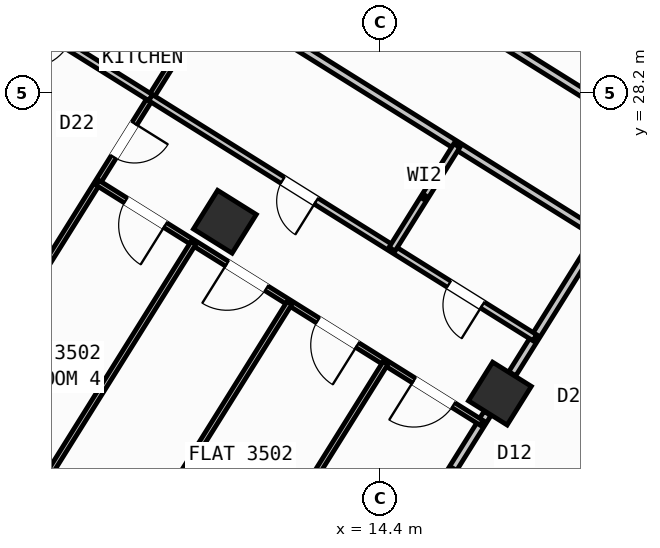
"""IFC4 building model, lengths in metres.
Left out: names, types, materials, properties, quantities, classifications, styles, units other than length and angle.
Written with IfcOpenShell. Run it as: python <this file> out.ifc"""

import sys

from ifc_helpers import new_model, si_unit, direction, frame, frame_2d, origin, origin_2d, place, context, subcontext, project, spatial, rectangle, hollow_rectangle, extrude, source, transform, mapped, element, fill, save


model = new_model("IFC4")
c1 = context("Model", 3, precision=1e-05, world=origin(), true_north=direction((0.0, 1.0)))
c2 = subcontext(c1, "Body", "Model", "MODEL_VIEW")
j1 = project(units=[si_unit("LENGTHUNIT", "METRE"), si_unit("PLANEANGLEUNIT", "RADIAN")], contexts=[c1])
p1 = place(None, origin())
s1 = spatial("IfcSite", under=j1, at=p1, CompositionType="ELEMENT")
p2 = place(p1, origin())
s2 = spatial("IfcBuilding", under=s1, at=p2, CompositionType="ELEMENT")
p3 = place(p2, frame((0.0, 0.0, 140.7)))
s3 = spatial("IfcBuildingStorey", under=s2, at=p3, CompositionType="ELEMENT", Elevation=140.7)
m1 = source(origin(), c2, "Body", "SweptSolid", [
    extrude(hollow_rectangle(XDim=0.9, YDim=0.9, WallThickness=0.036, at=origin_2d()), origin(), (0.0, 0.0, 1.0), 3.6),
])
for number, where, z_axis, x_axis in (
    (1, (16.764, 22.261, 0.0), (0.0, 0.0, 1.0), (-0.848, 0.53, 0.0)),
    (2, (11.336, 25.653, 0.0), (0.0, 0.0, 1.0), (-0.848, 0.53, 0.0)),
):
    element("IfcColumn", number, at=place(p3, frame(where, z_axis=z_axis, x_axis=x_axis)), inside=s3, PredefinedType="COLUMN", context=c2, shape_type="MappedRepresentation", body=[
        mapped(m1, transform((0.0, 0.0, 0.0), scale=1.0)),
    ])
p4 = place(p3, frame((29.268, 6.429, 0.0), z_axis=(0.0, 0.0, 1.0), x_axis=(-0.848049971435, 0.529916263149, 0.0)))
e3 = element("IfcWall", 3, at=p4, inside=s3, PredefinedType="STANDARD", context=c2, shape_type="SweptSolid", body=[
    extrude(rectangle(XDim=31.588, YDim=0.32, at=frame_2d((15.794, 0.0))), origin(), (0.0, 0.0, 1.0), 3.35),
])
p5 = place(p4, frame((16.362, 0.0, 0.0)))
e4 = element("IfcOpeningElement", 4, at=p5, cuts=e3, PredefinedType="OPENING", context=c2, shape_type="SweptSolid", body=[
    extrude(rectangle(XDim=1.2, YDim=2.15, at=frame_2d((0.6, 1.075))), frame((0.0, 0.17, 0.0), z_axis=(0.0, -1.0, 0.0), x_axis=(1.0, 0.0, 0.0)), (0.0, 0.0, 1.0), 0.34),
])
p6 = place(p4, frame((2.989, 0.0, 0.8)))
e5 = element("IfcOpeningElement", 5, at=p6, cuts=e3, PredefinedType="OPENING", context=c2, shape_type="SweptSolid", body=[
    extrude(rectangle(XDim=2.1, YDim=1.55, at=frame_2d((1.05, 0.775))), frame((0.0, 0.17, 0.0), z_axis=(0.0, -1.0, 0.0), x_axis=(1.0, 0.0, 0.0)), (0.0, 0.0, 1.0), 0.34),
])
p7 = place(p4, frame((8.359, 0.0, 0.8)))
e6 = element("IfcOpeningElement", 6, at=p7, cuts=e3, PredefinedType="OPENING", context=c2, shape_type="SweptSolid", body=[
    extrude(rectangle(XDim=2.1, YDim=1.55, at=frame_2d((1.05, 0.775))), frame((0.0, 0.17, 0.0), z_axis=(0.0, -1.0, 0.0), x_axis=(1.0, 0.0, 0.0)), (0.0, 0.0, 1.0), 0.34),
])
p8 = place(p4, frame((13.284, 0.0, 0.95)))
e7 = element("IfcOpeningElement", 7, at=p8, cuts=e3, PredefinedType="OPENING", context=c2, shape_type="SweptSolid", body=[
    extrude(rectangle(XDim=1.2, YDim=1.4, at=frame_2d((0.6, 0.7))), frame((0.0, 0.17, 0.0), z_axis=(0.0, -1.0, 0.0), x_axis=(1.0, 0.0, 0.0)), (0.0, 0.0, 1.0), 0.34),
])
p9 = place(p4, frame((29.188, 0.0, 0.95)))
e8 = element("IfcOpeningElement", 8, at=p9, cuts=e3, PredefinedType="OPENING", context=c2, shape_type="SweptSolid", body=[
    extrude(rectangle(XDim=1.2, YDim=1.4, at=frame_2d((0.6, 0.7))), frame((0.0, 0.17, 0.0), z_axis=(0.0, -1.0, 0.0), x_axis=(1.0, 0.0, 0.0)), (0.0, 0.0, 1.0), 0.34),
])
p10 = place(p4, frame((19.674, 0.0, 1.0)))
e9 = element("IfcOpeningElement", 9, at=p10, cuts=e3, PredefinedType="OPENING", context=c2, shape_type="SweptSolid", body=[
    extrude(rectangle(XDim=0.9, YDim=1.25, at=frame_2d((0.45, 0.625))), frame((0.0, 0.17, 0.0), z_axis=(0.0, -1.0, 0.0), x_axis=(1.0, 0.0, 0.0)), (0.0, 0.0, 1.0), 0.34),
])
p11 = place(p4, frame((21.896, 0.0, 1.0)))
e10 = element("IfcOpeningElement", 10, at=p11, cuts=e3, PredefinedType="OPENING", context=c2, shape_type="SweptSolid", body=[
    extrude(rectangle(XDim=0.9, YDim=1.25, at=frame_2d((0.45, 0.625))), frame((0.0, 0.17, 0.0), z_axis=(0.0, -1.0, 0.0), x_axis=(1.0, 0.0, 0.0)), (0.0, 0.0, 1.0), 0.34),
])
p12 = place(p4, frame((24.106, 0.0, 1.0)))
e11 = element("IfcOpeningElement", 11, at=p12, cuts=e3, PredefinedType="OPENING", context=c2, shape_type="SweptSolid", body=[
    extrude(rectangle(XDim=0.65, YDim=1.15, at=frame_2d((0.325, 0.575))), frame((0.0, 0.17, 0.0), z_axis=(0.0, -1.0, 0.0), x_axis=(1.0, 0.0, 0.0)), (0.0, 0.0, 1.0), 0.34),
])
p13 = place(p4, frame((26.366, 0.0, 1.0)))
e12 = element("IfcOpeningElement", 12, at=p13, cuts=e3, PredefinedType="OPENING", context=c2, shape_type="SweptSolid", body=[
    extrude(rectangle(XDim=0.9, YDim=1.25, at=frame_2d((0.45, 0.625))), frame((0.0, 0.17, 0.0), z_axis=(0.0, -1.0, 0.0), x_axis=(1.0, 0.0, 0.0)), (0.0, 0.0, 1.0), 0.34),
])
p14 = place(p3, frame((2.415, 23.452, 0.0), z_axis=(0.0, 0.0, 1.0), x_axis=(0.52991049553, 0.848053575387, 0.0)))
e13 = element("IfcWall", 13, at=p14, inside=s3, PredefinedType="STANDARD", context=c2, shape_type="SweptSolid", body=[
    extrude(rectangle(XDim=21.587, YDim=0.32, at=frame_2d((10.794, 0.0))), origin(), (0.0, 0.0, 1.0), 2.775),
])
p15 = place(p14, frame((2.356, 0.0, 0.8)))
e14 = element("IfcOpeningElement", 14, at=p15, cuts=e13, PredefinedType="OPENING", context=c2, shape_type="SweptSolid", body=[
    extrude(rectangle(XDim=2.1, YDim=1.55, at=frame_2d((1.05, 0.775))), frame((0.0, 0.17, 0.0), z_axis=(0.0, -1.0, 0.0), x_axis=(1.0, 0.0, 0.0)), (0.0, 0.0, 1.0), 0.34),
])
p16 = place(p14, frame((8.639, 0.0, 1.0)))
e15 = element("IfcOpeningElement", 15, at=p16, cuts=e13, PredefinedType="OPENING", context=c2, shape_type="SweptSolid", body=[
    extrude(rectangle(XDim=0.9, YDim=1.25, at=frame_2d((0.45, 0.625))), frame((0.0, 0.17, 0.0), z_axis=(0.0, -1.0, 0.0), x_axis=(1.0, 0.0, 0.0)), (0.0, 0.0, 1.0), 0.34),
])
p17 = place(p14, frame((17.744, 0.0, 0.85)))
e16 = element("IfcOpeningElement", 16, at=p17, cuts=e13, PredefinedType="OPENING", context=c2, shape_type="SweptSolid", body=[
    extrude(rectangle(XDim=1.5, YDim=1.5, at=frame_2d((0.75, 0.75))), frame((0.0, 0.17, 0.0), z_axis=(0.0, -1.0, 0.0), x_axis=(1.0, 0.0, 0.0)), (0.0, 0.0, 1.0), 0.34),
])
p18 = place(p3, frame((14.138, 41.825, 0.0), z_axis=(0.0, 0.0, 1.0), x_axis=(0.848046498049, -0.529921821731, 0.0)))
e17 = element("IfcWall", 17, at=p18, inside=s3, PredefinedType="STANDARD", context=c2, shape_type="SweptSolid", body=[
    extrude(rectangle(XDim=31.588, YDim=0.32, at=frame_2d((15.794, 0.0))), origin(), (0.0, 0.0, 1.0), 3.35),
])
p19 = place(p18, frame((2.949, 0.0, 0.0)))
e18 = element("IfcOpeningElement", 18, at=p19, cuts=e17, PredefinedType="OPENING", context=c2, shape_type="SweptSolid", body=[
    extrude(rectangle(XDim=1.05, YDim=2.15, at=frame_2d((0.525, 1.075))), frame((0.0, 0.17, 0.0), z_axis=(0.0, -1.0, 0.0), x_axis=(1.0, 0.0, 0.0)), (0.0, 0.0, 1.0), 0.34),
])
p20 = place(p18, frame((0.861, 0.0, 0.85)))
e19 = element("IfcOpeningElement", 19, at=p20, cuts=e17, PredefinedType="OPENING", context=c2, shape_type="SweptSolid", body=[
    extrude(rectangle(XDim=1.5, YDim=1.5, at=frame_2d((0.75, 0.75))), frame((0.0, 0.17, 0.0), z_axis=(0.0, -1.0, 0.0), x_axis=(1.0, 0.0, 0.0)), (0.0, 0.0, 1.0), 0.34),
])
p21 = place(p18, frame((8.494, 0.0, 0.85)))
e20 = element("IfcOpeningElement", 20, at=p21, cuts=e17, PredefinedType="OPENING", context=c2, shape_type="SweptSolid", body=[
    extrude(rectangle(XDim=1.8, YDim=1.5, at=frame_2d((0.9, 0.75))), frame((0.0, 0.17, 0.0), z_axis=(0.0, -1.0, 0.0), x_axis=(1.0, 0.0, 0.0)), (0.0, 0.0, 1.0), 0.34),
])
p22 = place(p18, frame((13.874, 0.0, 0.85)))
e21 = element("IfcOpeningElement", 21, at=p22, cuts=e17, PredefinedType="OPENING", context=c2, shape_type="SweptSolid", body=[
    extrude(rectangle(XDim=1.5, YDim=1.5, at=frame_2d((0.75, 0.75))), frame((0.0, 0.17, 0.0), z_axis=(0.0, -1.0, 0.0), x_axis=(1.0, 0.0, 0.0)), (0.0, 0.0, 1.0), 0.34),
])
p23 = place(p18, frame((17.104, 0.0, 1.0)))
e22 = element("IfcOpeningElement", 22, at=p23, cuts=e17, PredefinedType="OPENING", context=c2, shape_type="SweptSolid", body=[
    extrude(rectangle(XDim=0.9, YDim=1.25, at=frame_2d((0.45, 0.625))), frame((0.0, 0.17, 0.0), z_axis=(0.0, -1.0, 0.0), x_axis=(1.0, 0.0, 0.0)), (0.0, 0.0, 1.0), 0.34),
])
p24 = place(p18, frame((22.144, 0.0, 1.0)))
e23 = element("IfcOpeningElement", 23, at=p24, cuts=e17, PredefinedType="OPENING", context=c2, shape_type="SweptSolid", body=[
    extrude(rectangle(XDim=0.9, YDim=1.25, at=frame_2d((0.45, 0.625))), frame((0.0, 0.17, 0.0), z_axis=(0.0, -1.0, 0.0), x_axis=(1.0, 0.0, 0.0)), (0.0, 0.0, 1.0), 0.34),
])
p25 = place(p18, frame((27.744, 0.0, 1.0)))
e24 = element("IfcOpeningElement", 24, at=p25, cuts=e17, PredefinedType="OPENING", context=c2, shape_type="SweptSolid", body=[
    extrude(rectangle(XDim=0.9, YDim=1.25, at=frame_2d((0.45, 0.625))), frame((0.0, 0.17, 0.0), z_axis=(0.0, -1.0, 0.0), x_axis=(1.0, 0.0, 0.0)), (0.0, 0.0, 1.0), 0.34),
])
p26 = place(p3, frame((21.938, 23.391, 0.0), z_axis=(0.0, 0.0, 1.0), x_axis=(-0.529924725692, -0.848044683434, 0.0)))
e25 = element("IfcWall", 25, at=p26, inside=s3, PredefinedType="PARTITIONING", context=c2, shape_type="SweptSolid", body=[
    extrude(rectangle(XDim=10.35, YDim=0.16, at=frame_2d((5.175, 0.0))), origin(), (0.0, 0.0, 1.0), 3.34),
])
p27 = place(p3, frame((23.104, 25.256, 0.0), z_axis=(0.0, 0.0, 1.0), x_axis=(-0.848041752158, 0.529929416617, 0.0)))
e26 = element("IfcWall", 26, at=p27, inside=s3, PredefinedType="PARTITIONING", context=c2, shape_type="SweptSolid", body=[
    extrude(rectangle(XDim=16.73, YDim=0.16, at=frame_2d((8.365, 0.0))), origin(), (0.0, 0.0, 1.0), 3.34),
])
p28 = place(p27, frame((2.22, 0.0, 0.0)))
e27 = element("IfcOpeningElement", 27, at=p28, cuts=e26, PredefinedType="OPENING", context=c2, shape_type="SweptSolid", body=[
    extrude(rectangle(XDim=0.86, YDim=2.05, at=frame_2d((0.43, 1.025))), frame((0.0, 0.09, 0.0), z_axis=(0.0, -1.0, 0.0), x_axis=(1.0, 0.0, 0.0)), (0.0, 0.0, 1.0), 0.18),
])
p29 = place(p27, frame((12.084, 0.0, 0.0)))
e28 = element("IfcOpeningElement", 28, at=p29, cuts=e26, PredefinedType="OPENING", context=c2, shape_type="SweptSolid", body=[
    extrude(rectangle(XDim=1.0, YDim=2.1, at=frame_2d((0.5, 1.05))), frame((0.0, 0.09, 0.0), z_axis=(0.0, -1.0, 0.0), x_axis=(1.0, 0.0, 0.0)), (0.0, 0.0, 1.0), 0.18),
])
p30 = place(p3, frame((21.938, 23.391, 0.0), z_axis=(0.0, 0.0, 1.0), x_axis=(-0.848045850158, 0.529922858565, 0.0)))
e29 = element("IfcWall", 29, at=p30, inside=s3, PredefinedType="PARTITIONING", context=c2, shape_type="SweptSolid", body=[
    extrude(rectangle(XDim=16.73, YDim=0.16, at=frame_2d((8.365, 0.0))), origin(), (0.0, 0.0, 1.0), 3.34),
])
p31 = place(p30, frame((2.22, 0.0, 0.0)))
e30 = element("IfcOpeningElement", 30, at=p31, cuts=e29, PredefinedType="OPENING", context=c2, shape_type="SweptSolid", body=[
    extrude(rectangle(XDim=0.86, YDim=2.05, at=frame_2d((0.43, 1.025))), frame((0.0, 0.09, 0.0), z_axis=(0.0, -1.0, 0.0), x_axis=(1.0, 0.0, 0.0)), (0.0, 0.0, 1.0), 0.18),
])
p32 = place(p30, frame((14.22, 0.0, 0.0)))
e31 = element("IfcOpeningElement", 31, at=p32, cuts=e29, PredefinedType="OPENING", context=c2, shape_type="SweptSolid", body=[
    extrude(rectangle(XDim=1.0, YDim=2.1, at=frame_2d((0.5, 1.05))), frame((0.0, 0.09, 0.0), z_axis=(0.0, -1.0, 0.0), x_axis=(1.0, 0.0, 0.0)), (0.0, 0.0, 1.0), 0.18),
])
p33 = place(p3, frame((18.724, 25.399, 0.0), z_axis=(0.0, 0.0, 1.0), x_axis=(-0.529890499457, -0.848066069705, 0.0)))
e32 = element("IfcWall", 32, at=p33, inside=s3, PredefinedType="PARTITIONING", context=c2, shape_type="SweptSolid", body=[
    extrude(rectangle(XDim=3.238, YDim=0.16, at=frame_2d((1.619, 0.0))), origin(), (0.0, 0.0, 1.0), 2.775),
])
p34 = place(p3, frame((16.519, 21.87, 0.0), z_axis=(0.0, 0.0, 1.0), x_axis=(-0.529922447305, -0.848046107144, 0.0)))
e33 = element("IfcWall", 33, at=p34, inside=s3, PredefinedType="PARTITIONING", context=c2, shape_type="SweptSolid", body=[
    extrude(rectangle(XDim=5.451, YDim=0.16, at=frame_2d((2.726, 0.0))), origin(), (0.0, 0.0, 1.0), 2.775),
])
p35 = place(p3, frame((20.624, 24.212, 0.0), z_axis=(0.0, 0.0, 1.0), x_axis=(-0.529919283494, -0.848048084121, 0.0)))
e34 = element("IfcWall", 34, at=p35, inside=s3, PredefinedType="PLUMBINGWALL", context=c2, shape_type="SweptSolid", body=[
    extrude(rectangle(XDim=5.51, YDim=0.14, at=frame_2d((2.755, 0.0))), origin(), (0.0, 0.0, 1.0), 2.995),
])
p36 = place(p35, frame((2.365, 0.0, 0.0)))
e35 = element("IfcOpeningElement", 35, at=p36, cuts=e34, PredefinedType="OPENING", context=c2, shape_type="SweptSolid", body=[
    extrude(rectangle(XDim=0.78, YDim=2.05, at=frame_2d((0.39, 1.025))), frame((0.0, 0.08, 0.0), z_axis=(0.0, -1.0, 0.0), x_axis=(1.0, 0.0, 0.0)), (0.0, 0.0, 1.0), 0.16),
])
p37 = place(p3, frame((11.143, 30.136, 0.0), z_axis=(0.0, 0.0, 1.0), x_axis=(-0.529922479612, -0.848046086956, 0.0)))
e36 = element("IfcWall", 36, at=p37, inside=s3, PredefinedType="PARTITIONING", context=c2, shape_type="SweptSolid", body=[
    extrude(rectangle(XDim=10.62, YDim=0.11, at=frame_2d((5.31, 0.0))), origin(), (0.0, 0.0, 1.0), 3.34),
])
p38 = place(p37, frame((3.0, 0.0, 0.0)))
e37 = element("IfcOpeningElement", 37, at=p38, cuts=e36, PredefinedType="OPENING", context=c2, shape_type="SweptSolid", body=[
    extrude(rectangle(XDim=0.78, YDim=2.05, at=frame_2d((0.39, 1.025))), frame((0.0, 0.065, 0.0), z_axis=(0.0, -1.0, 0.0), x_axis=(1.0, 0.0, 0.0)), (0.0, 0.0, 1.0), 0.13),
])
p39 = place(p3, frame((9.871, 28.101, 0.0), z_axis=(0.0, 0.0, 1.0), x_axis=(-0.848025873403, 0.529954826413, 0.0)))
e38 = element("IfcWall", 38, at=p39, inside=s3, PredefinedType="PLUMBINGWALL", context=c2, shape_type="SweptSolid", body=[
    extrude(rectangle(XDim=3.98, YDim=0.14, at=frame_2d((1.99, 0.0))), origin(), (0.0, 0.0, 1.0), 3.34),
])
p40 = place(p39, frame((1.93, 0.0, 0.0)))
e39 = element("IfcOpeningElement", 39, at=p40, cuts=e38, PredefinedType="OPENING", context=c2, shape_type="SweptSolid", body=[
    extrude(rectangle(XDim=0.92, YDim=2.08, at=frame_2d((0.46, 1.04))), frame((0.0, 0.08, 0.0), z_axis=(0.0, -1.0, 0.0), x_axis=(1.0, 0.0, 0.0)), (0.0, 0.0, 1.0), 0.16),
])
p41 = place(p3, frame((17.452, 23.364, 0.0), z_axis=(0.0, 0.0, 1.0), x_axis=(-0.848044326704, 0.52992529657, 0.0)))
e40 = element("IfcWall", 40, at=p41, inside=s3, PredefinedType="PLUMBINGWALL", context=c2, shape_type="SweptSolid", body=[
    extrude(rectangle(XDim=8.94, YDim=0.14, at=frame_2d((4.47, 0.0))), origin(), (0.0, 0.0, 1.0), 3.34),
])
p42 = place(p41, frame((5.087, 0.0, 0.0)))
e41 = element("IfcOpeningElement", 41, at=p42, cuts=e40, PredefinedType="OPENING", context=c2, shape_type="SweptSolid", body=[
    extrude(rectangle(XDim=0.78, YDim=2.05, at=frame_2d((0.39, 1.025))), frame((0.0, 0.08, 0.0), z_axis=(0.0, -1.0, 0.0), x_axis=(1.0, 0.0, 0.0)), (0.0, 0.0, 1.0), 0.16),
])
p43 = place(p41, frame((1.218, 0.0, 0.0)))
e42 = element("IfcOpeningElement", 42, at=p43, cuts=e40, PredefinedType="OPENING", context=c2, shape_type="SweptSolid", body=[
    extrude(rectangle(XDim=0.78, YDim=2.05, at=frame_2d((0.39, 1.025))), frame((0.0, 0.08, 0.0), z_axis=(0.0, -1.0, 0.0), x_axis=(1.0, 0.0, 0.0)), (0.0, 0.0, 1.0), 0.16),
])
p44 = place(p3, frame((15.913, 27.156, 0.0), z_axis=(0.0, 0.0, 1.0), x_axis=(-0.529935194983, -0.848038141311, 0.0)))
e43 = element("IfcWall", 43, at=p44, inside=s3, PredefinedType="PLUMBINGWALL", context=c2, shape_type="SweptSolid", body=[
    extrude(rectangle(XDim=2.41, YDim=0.14, at=frame_2d((1.205, 0.0))), origin(), (0.0, 0.0, 1.0), 3.34),
])
p45 = place(p3, frame((16.403, 21.685, 0.0), z_axis=(0.0, 0.0, 1.0), x_axis=(-0.848044326704, 0.52992529657, 0.0)))
e44 = element("IfcWall", 44, at=p45, inside=s3, PredefinedType="PARTITIONING", context=c2, shape_type="SweptSolid", body=[
    extrude(rectangle(XDim=8.94, YDim=0.11, at=frame_2d((4.47, 0.0))), origin(), (0.0, 0.0, 1.0), 3.34),
])
p46 = place(p45, frame((0.657, 0.0, 0.0)))
e45 = element("IfcOpeningElement", 45, at=p46, cuts=e44, PredefinedType="OPENING", context=c2, shape_type="SweptSolid", body=[
    extrude(rectangle(XDim=0.92, YDim=2.08, at=frame_2d((0.46, 1.04))), frame((0.0, 0.065, 0.0), z_axis=(0.0, -1.0, 0.0), x_axis=(1.0, 0.0, 0.0)), (0.0, 0.0, 1.0), 0.13),
])
p47 = place(p45, frame((2.893, 0.0, 0.0)))
e46 = element("IfcOpeningElement", 46, at=p47, cuts=e44, PredefinedType="OPENING", context=c2, shape_type="SweptSolid", body=[
    extrude(rectangle(XDim=0.92, YDim=2.08, at=frame_2d((0.46, 1.04))), frame((0.0, 0.065, 0.0), z_axis=(0.0, -1.0, 0.0), x_axis=(1.0, 0.0, 0.0)), (0.0, 0.0, 1.0), 0.13),
])
p48 = place(p45, frame((5.008, 0.0, 0.0)))
e47 = element("IfcOpeningElement", 47, at=p48, cuts=e44, PredefinedType="OPENING", context=c2, shape_type="SweptSolid", body=[
    extrude(rectangle(XDim=0.92, YDim=2.08, at=frame_2d((0.46, 1.04))), frame((0.0, 0.065, 0.0), z_axis=(0.0, -1.0, 0.0), x_axis=(1.0, 0.0, 0.0)), (0.0, 0.0, 1.0), 0.13),
])
p49 = place(p45, frame((7.363, 0.0, 0.0)))
e48 = element("IfcOpeningElement", 48, at=p49, cuts=e44, PredefinedType="OPENING", context=c2, shape_type="SweptSolid", body=[
    extrude(rectangle(XDim=0.92, YDim=2.08, at=frame_2d((0.46, 1.04))), frame((0.0, 0.065, 0.0), z_axis=(0.0, -1.0, 0.0), x_axis=(1.0, 0.0, 0.0)), (0.0, 0.0, 1.0), 0.13),
])
for number, where, z_axis, x_axis in (
    (49, (14.508, 22.869, 0.0), (0.0, 0.0, 1.0), (-0.53, -0.848, 0.0)),
    (50, (12.613, 24.053, 0.0), (0.0, 0.0, 1.0), (-0.53, -0.848, 0.0)),
):
    element("IfcWall", number, at=place(p3, frame(where, z_axis=z_axis, x_axis=x_axis)), inside=s3, PredefinedType="PARTITIONING", context=c2, shape_type="SweptSolid", body=[
        extrude(rectangle(XDim=6.24, YDim=0.11, at=frame_2d((3.12, 0.0))), origin(), (0.0, 0.0, 1.0), 2.995),
    ])
p50 = place(p3, frame((10.717, 25.238, 0.0), z_axis=(0.0, 0.0, 1.0), x_axis=(-0.52991804857, -0.848048855786, 0.0)))
e51 = element("IfcWall", 51, at=p50, inside=s3, PredefinedType="PARTITIONING", context=c2, shape_type="SweptSolid", body=[
    extrude(rectangle(XDim=6.24, YDim=0.11, at=frame_2d((3.12, 0.0))), origin(), (0.0, 0.0, 1.0), 3.34),
])
m2 = source(origin(), c2, "Body", "SweptSolid", [
    extrude(rectangle(XDim=0.78, YDim=2.05, at=frame_2d((0.39, 1.025))), frame((0.0, 0.025, 0.0), z_axis=(0.0, -1.0, 0.0), x_axis=(1.0, 0.0, 0.0)), (0.0, 0.0, 1.0), 0.05),
])
p51 = place(p38, origin())
e52 = element("IfcDoor", 52, at=p51, inside=s3, OperationType="SINGLE_SWING_LEFT", PredefinedType="DOOR", context=c2, shape_type="MappedRepresentation", body=[
    mapped(m2, transform((0.0, 0.0, 0.0), scale=1.0)),
])
fill(e37, e52)
p52 = place(p42, origin())
e53 = element("IfcDoor", 53, at=p52, inside=s3, OperationType="SINGLE_SWING_LEFT", PredefinedType="DOOR", context=c2, shape_type="MappedRepresentation", body=[
    mapped(m2, transform((0.0, 0.0, 0.0), scale=1.0)),
])
fill(e41, e53)
p53 = place(p43, origin())
e54 = element("IfcDoor", 54, at=p53, inside=s3, OperationType="SINGLE_SWING_LEFT", PredefinedType="DOOR", context=c2, shape_type="MappedRepresentation", body=[
    mapped(m2, transform((0.0, 0.0, 0.0), scale=1.0)),
])
fill(e42, e54)
m3 = source(origin(), c2, "Body", "SweptSolid", [
    extrude(rectangle(XDim=0.92, YDim=2.08, at=frame_2d((0.46, 1.04))), frame((0.0, 0.025, 0.0), z_axis=(0.0, -1.0, 0.0), x_axis=(1.0, 0.0, 0.0)), (0.0, 0.0, 1.0), 0.05),
])
p54 = place(p46, origin())
e55 = element("IfcDoor", 55, at=p54, inside=s3, OperationType="SINGLE_SWING_RIGHT", PredefinedType="DOOR", context=c2, shape_type="MappedRepresentation", body=[
    mapped(m3, transform((0.0, 0.0, 0.0), scale=1.0)),
])
fill(e45, e55)
p55 = place(p47, origin())
e56 = element("IfcDoor", 56, at=p55, inside=s3, OperationType="SINGLE_SWING_LEFT", PredefinedType="DOOR", context=c2, shape_type="MappedRepresentation", body=[
    mapped(m3, transform((0.0, 0.0, 0.0), scale=1.0)),
])
fill(e46, e56)
p56 = place(p48, origin())
e57 = element("IfcDoor", 57, at=p56, inside=s3, OperationType="SINGLE_SWING_RIGHT", PredefinedType="DOOR", context=c2, shape_type="MappedRepresentation", body=[
    mapped(m3, transform((0.0, 0.0, 0.0), scale=1.0)),
])
fill(e47, e57)
p57 = place(p49, origin())
e58 = element("IfcDoor", 58, at=p57, inside=s3, OperationType="SINGLE_SWING_LEFT", PredefinedType="DOOR", context=c2, shape_type="MappedRepresentation", body=[
    mapped(m3, transform((0.0, 0.0, 0.0), scale=1.0)),
])
fill(e48, e58)
save(model, sys.argv[1])
